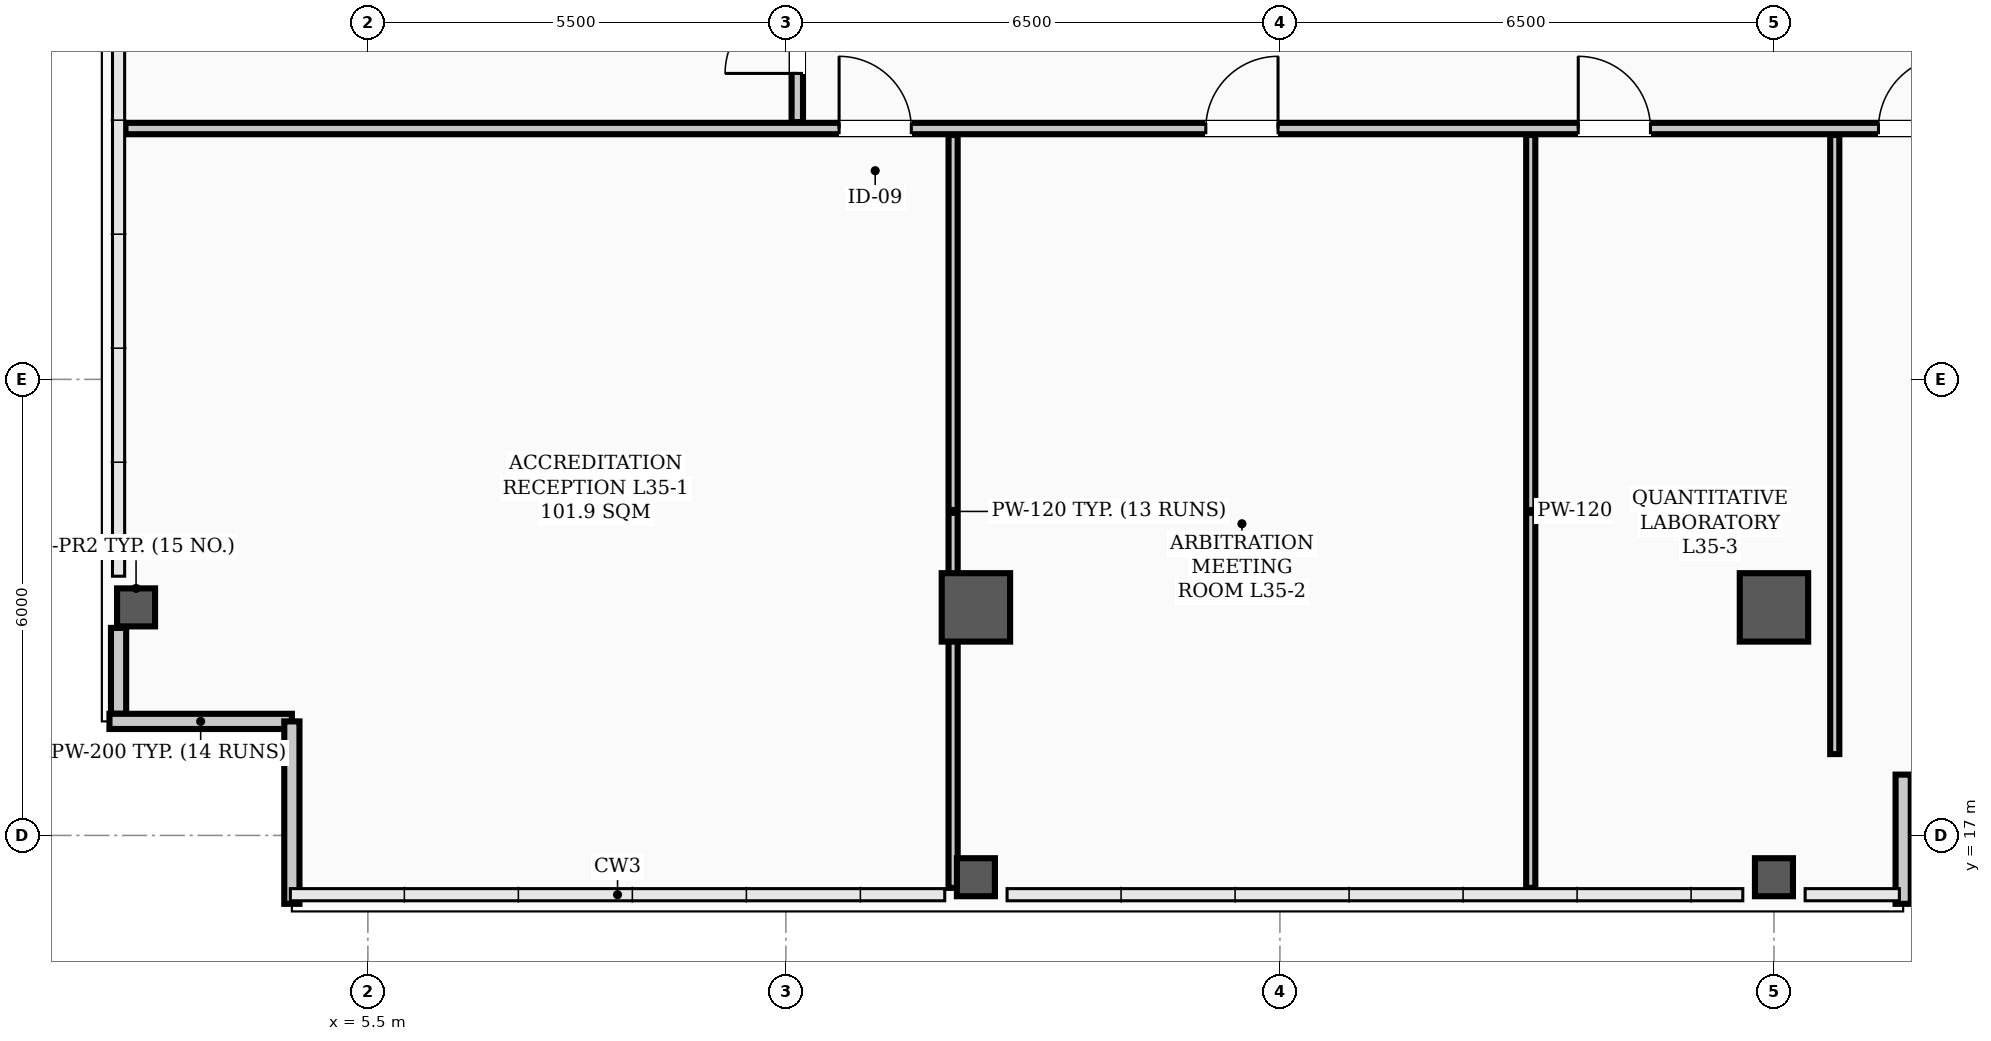
"""IFC4 building model, lengths in metres.
Left out: names, types, materials, properties, quantities, classifications, styles, units other than length and angle.
Written with IfcOpenShell. Run it as: python <this file> out.ifc"""

import sys

from ifc_helpers import new_model, si_unit, direction, frame, frame_2d, origin, origin_2d, place, context, subcontext, project, spatial, rectangle, hollow_rectangle, extrude, element, fill, save


model = new_model("IFC4")
c1 = context("Model", 3, precision=1e-05, world=origin(), true_north=direction((0.0, 1.0)))
c2 = subcontext(c1, "Body", "Model", "MODEL_VIEW")
j1 = project(units=[si_unit("LENGTHUNIT", "METRE"), si_unit("PLANEANGLEUNIT", "RADIAN")], contexts=[c1])
p1 = place(None, origin())
s1 = spatial("IfcSite", under=j1, at=p1, CompositionType="ELEMENT")
p2 = place(p1, origin())
s2 = spatial("IfcBuilding", under=s1, at=p2, CompositionType="ELEMENT")
p3 = place(p2, frame((0.0, 0.0, 142.2)))
s3 = spatial("IfcBuildingStorey", under=s2, at=p3, CompositionType="ELEMENT", Elevation=142.2)
for number, where, z_axis, x_axis in (
    (1, (13.5, 20.0, 0.0), (0.0, 0.0, 1.0), (1.0, 0.0, 0.0)),
    (2, (24.0, 20.0, 0.0), (0.0, 0.0, 1.0), (1.0, 0.0, 0.0)),
):
    element("IfcColumn", number, at=place(p3, frame(where, z_axis=z_axis, x_axis=x_axis)), inside=s3, PredefinedType="COLUMN", context=c2, shape_type="SweptSolid", body=[
        extrude(hollow_rectangle(XDim=0.9, YDim=0.9, WallThickness=0.035, InnerFilletRadius=0.017, OuterFilletRadius=0.052, at=origin_2d()), origin(), (0.0, 0.0, 1.0), 3.9),
    ])
for number, where, z_axis, x_axis in (
    (3, (2.45, 20.0, 0.0), (0.0, 0.0, 1.0), (1.0, 0.0, 0.0)),
    (4, (13.5, 16.45, 0.0), (0.0, 0.0, 1.0), (1.0, 0.0, 0.0)),
    (5, (24.0, 16.45, 0.0), (0.0, 0.0, 1.0), (1.0, 0.0, 0.0)),
):
    element("IfcColumn", number, at=place(p3, frame(where, z_axis=z_axis, x_axis=x_axis)), inside=s3, PredefinedType="COLUMN", context=c2, shape_type="SweptSolid", body=[
        extrude(hollow_rectangle(XDim=0.5, YDim=0.5, WallThickness=0.024, InnerFilletRadius=0.012, OuterFilletRadius=0.036, at=origin_2d()), origin(), (0.0, 0.0, 1.0), 3.9),
    ])
p4 = place(p3, frame((2.22, 18.6, 0.0), z_axis=(0.0, 0.0, 1.0), x_axis=(0.0, 1.0, 0.0)))
e6 = element("IfcWall", 6, at=p4, inside=s3, PredefinedType="PARAPET", context=c2, shape_type="SweptSolid", body=[
    extrude(rectangle(XDim=1.13, YDim=0.2, at=frame_2d((0.565, 0.0))), origin(), (0.0, 0.0, 1.0), 1.2),
])
for number, where, z_axis, x_axis in (
    (7, (2.1, 18.5, 0.0), (0.0, 0.0, 1.0), (1.0, 0.0, 0.0)),
    (8, (4.5, 18.5, 0.0), (0.0, 0.0, 1.0), (0.0, -1.0, 0.0)),
):
    element("IfcWall", number, at=place(p3, frame(where, z_axis=z_axis, x_axis=x_axis)), inside=s3, PredefinedType="PARAPET", context=c2, shape_type="SweptSolid", body=[
        extrude(rectangle(XDim=2.4, YDim=0.2, at=frame_2d((1.2, 0.0))), origin(), (0.0, 0.0, 1.0), 1.2),
    ])
p5 = place(p3, frame((25.7, 16.1, 0.0), z_axis=(0.0, 0.0, 1.0), x_axis=(0.0, 1.0, 0.0)))
e9 = element("IfcWall", 9, at=p5, inside=s3, PredefinedType="PARAPET", context=c2, shape_type="SweptSolid", body=[
    extrude(rectangle(XDim=1.7, YDim=0.2, at=frame_2d((0.85, 0.0))), origin(), (0.0, 0.0, 1.0), 1.2),
])
p6 = place(p3, frame((2.31, 26.3, 0.0), z_axis=(0.0, 0.0, 1.0), x_axis=(1.0, 0.0, 0.0)))
e10 = element("IfcWall", 10, at=p6, inside=s3, PredefinedType="PARTITIONING", context=c2, shape_type="SweptSolid", body=[
    extrude(rectangle(XDim=46.38, YDim=0.15, at=frame_2d((23.19, 0.0))), origin(), (0.0, 0.0, 1.0), 3.1),
])
p7 = place(p6, frame((9.39, 0.0, 0.0)))
e11 = element("IfcOpeningElement", 11, at=p7, cuts=e10, PredefinedType="OPENING", context=c2, shape_type="SweptSolid", body=[
    extrude(rectangle(XDim=0.95, YDim=2.08, at=frame_2d((0.475, 1.04))), frame((0.0, 0.085, 0.0), z_axis=(0.0, -1.0, 0.0), x_axis=(1.0, 0.0, 0.0)), (0.0, 0.0, 1.0), 0.17),
])
p8 = place(p6, frame((14.215, 0.0, 0.0)))
e12 = element("IfcOpeningElement", 12, at=p8, cuts=e10, PredefinedType="OPENING", context=c2, shape_type="SweptSolid", body=[
    extrude(rectangle(XDim=0.95, YDim=2.08, at=frame_2d((0.475, 1.04))), frame((0.0, 0.085, 0.0), z_axis=(0.0, -1.0, 0.0), x_axis=(1.0, 0.0, 0.0)), (0.0, 0.0, 1.0), 0.17),
])
p9 = place(p6, frame((19.115, 0.0, 0.0)))
e13 = element("IfcOpeningElement", 13, at=p9, cuts=e10, PredefinedType="OPENING", context=c2, shape_type="SweptSolid", body=[
    extrude(rectangle(XDim=0.95, YDim=2.08, at=frame_2d((0.475, 1.04))), frame((0.0, 0.085, 0.0), z_axis=(0.0, -1.0, 0.0), x_axis=(1.0, 0.0, 0.0)), (0.0, 0.0, 1.0), 0.17),
])
p10 = place(p6, frame((23.065, 0.0, 0.0)))
e14 = element("IfcOpeningElement", 14, at=p10, cuts=e10, PredefinedType="OPENING", context=c2, shape_type="SweptSolid", body=[
    extrude(rectangle(XDim=0.95, YDim=2.08, at=frame_2d((0.475, 1.04))), frame((0.0, 0.085, 0.0), z_axis=(0.0, -1.0, 0.0), x_axis=(1.0, 0.0, 0.0)), (0.0, 0.0, 1.0), 0.17),
])
p11 = place(p6, frame((37.715, 0.0, 0.0)))
e15 = element("IfcOpeningElement", 15, at=p11, cuts=e10, PredefinedType="OPENING", context=c2, shape_type="SweptSolid", body=[
    extrude(rectangle(XDim=0.95, YDim=2.08, at=frame_2d((0.475, 1.04))), frame((0.0, 0.085, 0.0), z_axis=(0.0, -1.0, 0.0), x_axis=(1.0, 0.0, 0.0)), (0.0, 0.0, 1.0), 0.17),
])
p12 = place(p6, frame((43.66, 0.0, 0.0)))
e16 = element("IfcOpeningElement", 16, at=p12, cuts=e10, PredefinedType="OPENING", context=c2, shape_type="SweptSolid", body=[
    extrude(rectangle(XDim=0.95, YDim=2.08, at=frame_2d((0.475, 1.04))), frame((0.0, 0.085, 0.0), z_axis=(0.0, -1.0, 0.0), x_axis=(1.0, 0.0, 0.0)), (0.0, 0.0, 1.0), 0.17),
])
p13 = place(p3, frame((11.15, 26.385, 0.0), z_axis=(0.0, 0.0, 1.0), x_axis=(0.0, 1.0, 0.0)))
e17 = element("IfcWall", 17, at=p13, inside=s3, PredefinedType="PARTITIONING", context=c2, shape_type="SweptSolid", body=[
    extrude(rectangle(XDim=13.58, YDim=0.15, at=frame_2d((6.79, 0.0))), origin(), (0.0, 0.0, 1.0), 3.0),
])
p14 = place(p13, frame((0.64, 0.0, 0.0)))
e18 = element("IfcOpeningElement", 18, at=p14, cuts=e17, PredefinedType="OPENING", context=c2, shape_type="SweptSolid", body=[
    extrude(rectangle(XDim=0.95, YDim=2.08, at=frame_2d((0.475, 1.04))), frame((0.0, 0.085, 0.0), z_axis=(0.0, -1.0, 0.0), x_axis=(1.0, 0.0, 0.0)), (0.0, 0.0, 1.0), 0.17),
])
p15 = place(p13, frame((6.94, 0.0, 0.0)))
e19 = element("IfcOpeningElement", 19, at=p15, cuts=e17, PredefinedType="OPENING", context=c2, shape_type="SweptSolid", body=[
    extrude(rectangle(XDim=0.95, YDim=2.08, at=frame_2d((0.475, 1.04))), frame((0.0, 0.085, 0.0), z_axis=(0.0, -1.0, 0.0), x_axis=(1.0, 0.0, 0.0)), (0.0, 0.0, 1.0), 0.17),
])
p16 = place(p13, frame((11.065, 0.0, 0.0)))
e20 = element("IfcOpeningElement", 20, at=p16, cuts=e17, PredefinedType="OPENING", context=c2, shape_type="SweptSolid", body=[
    extrude(rectangle(XDim=0.95, YDim=2.08, at=frame_2d((0.475, 1.04))), frame((0.0, 0.085, 0.0), z_axis=(0.0, -1.0, 0.0), x_axis=(1.0, 0.0, 0.0)), (0.0, 0.0, 1.0), 0.17),
])
for number, where, z_axis, x_axis in (
    (21, (13.2, 16.31, 0.0), (0.0, 0.0, 1.0), (0.0, 1.0, 0.0)),
    (22, (20.8, 16.31, 0.0), (0.0, 0.0, 1.0), (0.0, 1.0, 0.0)),
):
    element("IfcWall", number, at=place(p3, frame(where, z_axis=z_axis, x_axis=x_axis)), inside=s3, PredefinedType="PARTITIONING", context=c2, shape_type="SweptSolid", body=[
        extrude(rectangle(XDim=9.905, YDim=0.12, at=frame_2d((4.953, 0.0))), origin(), (0.0, 0.0, 1.0), 3.0),
    ])
p17 = place(p3, frame((24.8, 18.07, 0.0), z_axis=(0.0, 0.0, 1.0), x_axis=(0.0, 1.0, 0.0)))
e23 = element("IfcWall", 23, at=p17, inside=s3, PredefinedType="PARTITIONING", context=c2, shape_type="SweptSolid", body=[
    extrude(rectangle(XDim=8.145, YDim=0.12, at=frame_2d((4.073, 0.0))), origin(), (0.0, 0.0, 1.0), 3.0),
])
p18 = place(p7, origin())
e24 = element("IfcDoor", 24, at=p18, inside=s3, OperationType="SINGLE_SWING_LEFT", PredefinedType="DOOR", context=c2, shape_type="SweptSolid", body=[
    extrude(rectangle(XDim=0.95, YDim=2.08, at=frame_2d((0.475, 1.04))), frame((0.0, 0.025, 0.0), z_axis=(0.0, -1.0, 0.0), x_axis=(1.0, 0.0, 0.0)), (0.0, 0.0, 1.0), 0.05),
])
fill(e11, e24)
p19 = place(p8, origin())
e25 = element("IfcDoor", 25, at=p19, inside=s3, OperationType="SINGLE_SWING_RIGHT", PredefinedType="DOOR", context=c2, shape_type="SweptSolid", body=[
    extrude(rectangle(XDim=0.95, YDim=2.08, at=frame_2d((0.475, 1.04))), frame((0.0, 0.025, 0.0), z_axis=(0.0, -1.0, 0.0), x_axis=(1.0, 0.0, 0.0)), (0.0, 0.0, 1.0), 0.05),
])
fill(e12, e25)
p20 = place(p9, origin())
e26 = element("IfcDoor", 26, at=p20, inside=s3, OperationType="SINGLE_SWING_LEFT", PredefinedType="DOOR", context=c2, shape_type="SweptSolid", body=[
    extrude(rectangle(XDim=0.95, YDim=2.08, at=frame_2d((0.475, 1.04))), frame((0.0, 0.025, 0.0), z_axis=(0.0, -1.0, 0.0), x_axis=(1.0, 0.0, 0.0)), (0.0, 0.0, 1.0), 0.05),
])
fill(e13, e26)
p21 = place(p10, origin())
e27 = element("IfcDoor", 27, at=p21, inside=s3, OperationType="SINGLE_SWING_RIGHT", PredefinedType="DOOR", context=c2, shape_type="SweptSolid", body=[
    extrude(rectangle(XDim=0.95, YDim=2.08, at=frame_2d((0.475, 1.04))), frame((0.0, 0.025, 0.0), z_axis=(0.0, -1.0, 0.0), x_axis=(1.0, 0.0, 0.0)), (0.0, 0.0, 1.0), 0.05),
])
fill(e14, e27)
p22 = place(p14, origin())
e28 = element("IfcDoor", 28, at=p22, inside=s3, OperationType="SINGLE_SWING_LEFT", PredefinedType="DOOR", context=c2, shape_type="SweptSolid", body=[
    extrude(rectangle(XDim=0.95, YDim=2.08, at=frame_2d((0.475, 1.04))), frame((0.0, 0.025, 0.0), z_axis=(0.0, -1.0, 0.0), x_axis=(1.0, 0.0, 0.0)), (0.0, 0.0, 1.0), 0.05),
])
fill(e18, e28)
save(model, sys.argv[1])
